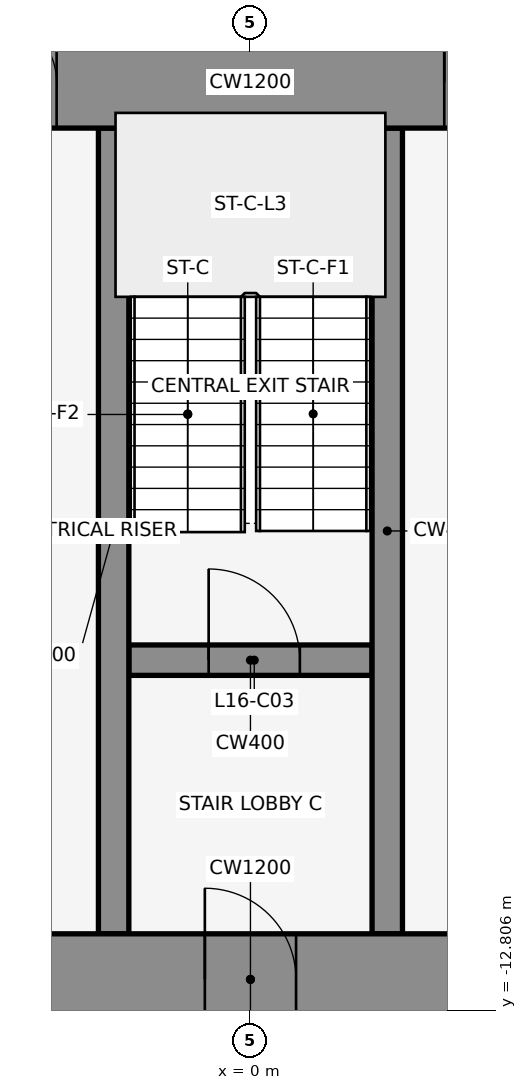
"""IFC4 building model, lengths in metres.
Left out: names, types, materials, properties, quantities, classifications, styles, units other than length and angle.
Written with IfcOpenShell. Run it as: python <this file> out.ifc"""

import sys

from ifc_helpers import new_model, si_unit, direction, frame, frame_2d, origin, place, context, subcontext, project, spatial, rectangle, extrude, element, fill, save


model = new_model("IFC4")
c1 = context("Model", 3, precision=1e-05, world=origin(), true_north=direction((0.0, 1.0)))
c2 = subcontext(c1, "Body", "Model", "MODEL_VIEW")
j1 = project(units=[si_unit("LENGTHUNIT", "METRE"), si_unit("PLANEANGLEUNIT", "RADIAN")], contexts=[c1])
p1 = place(None, origin())
s1 = spatial("IfcSite", under=j1, at=p1, CompositionType="ELEMENT")
p2 = place(p1, origin())
s2 = spatial("IfcBuilding", under=s1, at=p2, CompositionType="ELEMENT")
p3 = place(p2, frame((0.0, 0.0, 80.0)))
s3 = spatial("IfcBuildingStorey", under=s2, at=p3, CompositionType="ELEMENT", Elevation=80.0)
for number, where, z_axis, x_axis in (
    (1, (1.901, 1.08, 0.0), (0.0, 0.0, 1.0), (-0.84, -0.543, 0.0)),
    (2, (-0.068, -0.105, 0.0), (0.0, 0.0, 1.0), (-0.84, 0.543, 0.0)),
):
    element("IfcWall", number, at=place(p3, frame(where, z_axis=z_axis, x_axis=x_axis)), inside=s3, PredefinedType="STANDARD", context=c2, shape_type="SweptSolid", body=[
        extrude(rectangle(XDim=2.183, YDim=0.25, at=frame_2d((1.091, 0.0))), origin(), (0.0, 0.0, 1.0), 4.3),
    ])
p4 = place(p3, frame((-1.6, -8.2, 0.0), z_axis=(0.0, 0.0, 1.0), x_axis=(1.0, 0.0, 0.0)))
e3 = element("IfcWall", 3, at=p4, inside=s3, PredefinedType="SHEAR", context=c2, shape_type="SweptSolid", body=[
    extrude(rectangle(XDim=3.2, YDim=0.4, at=frame_2d((1.6, 0.0))), origin(), (0.0, 0.0, 1.0), 4.5),
])
p5 = place(p4, frame((1.05, 0.0, 0.0)))
e4 = element("IfcOpeningElement", 4, at=p5, cuts=e3, PredefinedType="OPENING", context=c2, shape_type="SweptSolid", body=[
    extrude(rectangle(XDim=1.2, YDim=2.1, at=frame_2d((0.6, 1.05))), frame((0.0, 0.212, 0.0), z_axis=(0.0, -1.0, 0.0), x_axis=(1.0, 0.0, 0.0)), (0.0, 0.0, 1.0), 0.424),
])
for number, where, z_axis, x_axis in (
    (5, (-1.8, -11.8, 0.0), (0.0, 0.0, 1.0), (0.0, 1.0, 0.0)),
    (6, (1.8, -11.8, 0.0), (0.0, 0.0, 1.0), (0.0, 1.0, 0.0)),
):
    element("IfcWall", number, at=place(p3, frame(where, z_axis=z_axis, x_axis=x_axis)), inside=s3, PredefinedType="SHEAR", context=c2, shape_type="SweptSolid", body=[
        extrude(rectangle(XDim=10.6, YDim=0.4, at=frame_2d((5.3, 0.0))), origin(), (0.0, 0.0, 1.0), 4.5),
    ])
p6 = place(p3, frame((-22.0, -0.6, 0.0), z_axis=(0.0, 0.0, 1.0), x_axis=(1.0, 0.0, 0.0)))
e7 = element("IfcWall", 7, at=p6, inside=s3, PredefinedType="SHEAR", context=c2, shape_type="SweptSolid", body=[
    extrude(rectangle(XDim=44.0, YDim=1.2, at=frame_2d((22.0, 0.0))), origin(), (0.0, 0.0, 1.0), 4.5),
])
p7 = place(p6, frame((18.55, 0.0, 0.0)))
e8 = element("IfcOpeningElement", 8, at=p7, cuts=e7, PredefinedType="OPENING", context=c2, shape_type="SweptSolid", body=[
    extrude(rectangle(XDim=0.9, YDim=2.1, at=frame_2d((0.45, 1.05))), frame((0.0, 0.612, 0.0), z_axis=(0.0, -1.0, 0.0), x_axis=(1.0, 0.0, 0.0)), (0.0, 0.0, 1.0), 1.224),
])
p8 = place(p6, frame((24.55, 0.0, 0.0)))
e9 = element("IfcOpeningElement", 9, at=p8, cuts=e7, PredefinedType="OPENING", context=c2, shape_type="SweptSolid", body=[
    extrude(rectangle(XDim=0.9, YDim=2.1, at=frame_2d((0.45, 1.05))), frame((0.0, 0.612, 0.0), z_axis=(0.0, -1.0, 0.0), x_axis=(1.0, 0.0, 0.0)), (0.0, 0.0, 1.0), 1.224),
])
p9 = place(p3, frame((-22.0, -12.4, 0.0), z_axis=(0.0, 0.0, 1.0), x_axis=(1.0, 0.0, 0.0)))
e10 = element("IfcWall", 10, at=p9, inside=s3, PredefinedType="SHEAR", context=c2, shape_type="SweptSolid", body=[
    extrude(rectangle(XDim=44.0, YDim=1.2, at=frame_2d((22.0, 0.0))), origin(), (0.0, 0.0, 1.0), 4.5),
])
p10 = place(p9, frame((2.2, 0.0, 0.0)))
e11 = element("IfcOpeningElement", 11, at=p10, cuts=e10, PredefinedType="OPENING", context=c2, shape_type="SweptSolid", body=[
    extrude(rectangle(XDim=1.2, YDim=2.1, at=frame_2d((0.6, 1.05))), frame((0.0, 0.612, 0.0), z_axis=(0.0, -1.0, 0.0), x_axis=(1.0, 0.0, 0.0)), (0.0, 0.0, 1.0), 1.224),
])
p11 = place(p9, frame((21.4, 0.0, 0.0)))
e12 = element("IfcOpeningElement", 12, at=p11, cuts=e10, PredefinedType="OPENING", context=c2, shape_type="SweptSolid", body=[
    extrude(rectangle(XDim=1.2, YDim=2.1, at=frame_2d((0.6, 1.05))), frame((0.0, 0.612, 0.0), z_axis=(0.0, -1.0, 0.0), x_axis=(1.0, 0.0, 0.0)), (0.0, 0.0, 1.0), 1.224),
])
p12 = place(p9, frame((40.6, 0.0, 0.0)))
e13 = element("IfcOpeningElement", 13, at=p12, cuts=e10, PredefinedType="OPENING", context=c2, shape_type="SweptSolid", body=[
    extrude(rectangle(XDim=1.2, YDim=2.1, at=frame_2d((0.6, 1.05))), frame((0.0, 0.612, 0.0), z_axis=(0.0, -1.0, 0.0), x_axis=(1.0, 0.0, 0.0)), (0.0, 0.0, 1.0), 1.224),
])
p13 = place(p9, frame((16.0, 0.0, 0.0)))
e14 = element("IfcOpeningElement", 14, at=p13, cuts=e10, PredefinedType="OPENING", context=c2, shape_type="SweptSolid", body=[
    extrude(rectangle(XDim=1.8, YDim=2.1, at=frame_2d((0.9, 1.05))), frame((0.0, 0.612, 0.0), z_axis=(0.0, -1.0, 0.0), x_axis=(1.0, 0.0, 0.0)), (0.0, 0.0, 1.0), 1.224),
])
p14 = place(p9, frame((6.3, 0.0, 0.0)))
e15 = element("IfcOpeningElement", 15, at=p14, cuts=e10, PredefinedType="OPENING", context=c2, shape_type="SweptSolid", body=[
    extrude(rectangle(XDim=1.2, YDim=2.1, at=frame_2d((0.6, 1.05))), frame((0.0, 0.612, 0.0), z_axis=(0.0, -1.0, 0.0), x_axis=(1.0, 0.0, 0.0)), (0.0, 0.0, 1.0), 1.224),
])
p15 = place(p9, frame((26.2, 0.0, 0.0)))
e16 = element("IfcOpeningElement", 16, at=p15, cuts=e10, PredefinedType="OPENING", context=c2, shape_type="SweptSolid", body=[
    extrude(rectangle(XDim=1.8, YDim=2.1, at=frame_2d((0.9, 1.05))), frame((0.0, 0.612, 0.0), z_axis=(0.0, -1.0, 0.0), x_axis=(1.0, 0.0, 0.0)), (0.0, 0.0, 1.0), 1.224),
])
p16 = place(p9, frame((36.5, 0.0, 0.0)))
e17 = element("IfcOpeningElement", 17, at=p16, cuts=e10, PredefinedType="OPENING", context=c2, shape_type="SweptSolid", body=[
    extrude(rectangle(XDim=1.2, YDim=2.1, at=frame_2d((0.6, 1.05))), frame((0.0, 0.612, 0.0), z_axis=(0.0, -1.0, 0.0), x_axis=(1.0, 0.0, 0.0)), (0.0, 0.0, 1.0), 1.224),
])
p17 = place(p5, origin())
e18 = element("IfcDoor", 18, at=p17, inside=s3, OperationType="SINGLE_SWING_LEFT", PredefinedType="DOOR", context=c2, shape_type="SweptSolid", body=[
    extrude(rectangle(XDim=1.2, YDim=2.1, at=frame_2d((0.6, 1.05))), frame((0.0, 0.025, 0.0), z_axis=(0.0, -1.0, 0.0), x_axis=(1.0, 0.0, 0.0)), (0.0, 0.0, 1.0), 0.05),
])
fill(e4, e18)
p18 = place(p7, origin())
e19 = element("IfcDoor", 19, at=p18, inside=s3, OperationType="SINGLE_SWING_LEFT", PredefinedType="DOOR", context=c2, shape_type="SweptSolid", body=[
    extrude(rectangle(XDim=0.9, YDim=2.1, at=frame_2d((0.45, 1.05))), frame((0.0, 0.025, 0.0), z_axis=(0.0, -1.0, 0.0), x_axis=(1.0, 0.0, 0.0)), (0.0, 0.0, 1.0), 0.05),
])
fill(e8, e19)
p19 = place(p8, origin())
e20 = element("IfcDoor", 20, at=p19, inside=s3, OperationType="SINGLE_SWING_LEFT", PredefinedType="DOOR", context=c2, shape_type="SweptSolid", body=[
    extrude(rectangle(XDim=0.9, YDim=2.1, at=frame_2d((0.45, 1.05))), frame((0.0, 0.025, 0.0), z_axis=(0.0, -1.0, 0.0), x_axis=(1.0, 0.0, 0.0)), (0.0, 0.0, 1.0), 0.05),
])
fill(e9, e20)
p20 = place(p11, frame((1.2, 0.0, 0.0), z_axis=(0.0, 0.0, 1.0), x_axis=(-1.0, 0.0, 0.0)))
e21 = element("IfcDoor", 21, at=p20, inside=s3, OperationType="SINGLE_SWING_RIGHT", PredefinedType="DOOR", context=c2, shape_type="SweptSolid", body=[
    extrude(rectangle(XDim=1.2, YDim=2.1, at=frame_2d((0.6, 1.05))), frame((0.0, 0.025, 0.0), z_axis=(0.0, -1.0, 0.0), x_axis=(1.0, 0.0, 0.0)), (0.0, 0.0, 1.0), 0.05),
])
fill(e12, e21)
save(model, sys.argv[1])
